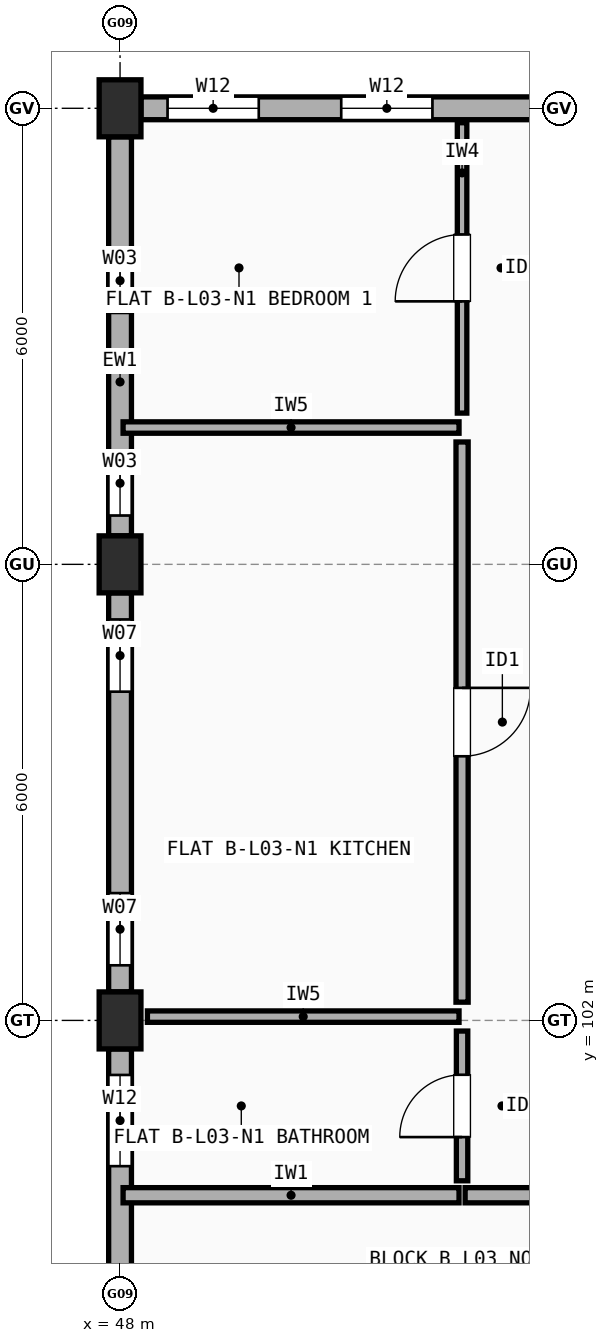
"""IFC4 building model, lengths in metres.
Left out: names, types, materials, properties, quantities, classifications, styles, units other than length and angle.
Written with IfcOpenShell. Run it as: python <this file> out.ifc"""

import sys

from ifc_helpers import new_model, si_unit, direction, frame, frame_2d, origin, origin_2d, place, context, subcontext, project, spatial, rectangle, extrude, element, fill, save


model = new_model("IFC4")
c1 = context("Model", 3, precision=1e-05, world=origin(), true_north=direction((0.0, 1.0)))
c2 = subcontext(c1, "Body", "Model", "MODEL_VIEW")
j1 = project(units=[si_unit("LENGTHUNIT", "METRE"), si_unit("PLANEANGLEUNIT", "RADIAN")], contexts=[c1])
p1 = place(None, origin())
s1 = spatial("IfcSite", under=j1, at=p1, CompositionType="ELEMENT")
p2 = place(p1, origin())
s2 = spatial("IfcBuilding", under=s1, at=p2, CompositionType="ELEMENT")
p3 = place(p2, frame((0.0, 0.0, 10.9)))
s3 = spatial("IfcBuildingStorey", under=s2, at=p3, CompositionType="ELEMENT", Elevation=10.9)
for number, where, z_axis, x_axis in (
    (1, (48.0, 102.0, 0.0), (0.0, 0.0, 1.0), (1.0, 0.0, 0.0)),
    (2, (48.0, 108.0, 0.0), (0.0, 0.0, 1.0), (1.0, 0.0, 0.0)),
    (3, (48.0, 114.0, 0.0), (0.0, 0.0, 1.0), (1.0, 0.0, 0.0)),
):
    element("IfcColumn", number, at=place(p3, frame(where, z_axis=z_axis, x_axis=x_axis)), inside=s3, PredefinedType="COLUMN", context=c2, shape_type="SweptSolid", body=[
        extrude(rectangle(XDim=0.55, YDim=0.75, at=origin_2d()), origin(), (0.0, 0.0, 1.0), 2.96),
    ])
p4 = place(p3, frame((53.675, 114.0, 0.0), z_axis=(0.0, 0.0, 1.0), x_axis=(-1.0, 0.0, 0.0)))
e4 = element("IfcWall", 4, at=p4, inside=s3, PredefinedType="STANDARD", context=c2, shape_type="SweptSolid", body=[
    extrude(rectangle(XDim=5.4, YDim=0.3, at=frame_2d((2.7, 0.0))), origin(), (0.0, 0.0, 1.0), 2.442),
])
p5 = place(p4, frame((1.565, 0.0, 0.9)))
e5 = element("IfcOpeningElement", 5, at=p5, cuts=e4, PredefinedType="OPENING", context=c2, shape_type="SweptSolid", body=[
    extrude(rectangle(XDim=1.2, YDim=1.35, at=frame_2d((0.6, 0.675))), frame((0.0, 0.16, 0.0), z_axis=(0.0, -1.0, 0.0), x_axis=(1.0, 0.0, 0.0)), (0.0, 0.0, 1.0), 0.32),
])
p6 = place(p4, frame((3.85, 0.0, 0.9)))
e6 = element("IfcOpeningElement", 6, at=p6, cuts=e4, PredefinedType="OPENING", context=c2, shape_type="SweptSolid", body=[
    extrude(rectangle(XDim=1.2, YDim=1.35, at=frame_2d((0.6, 0.675))), frame((0.0, 0.16, 0.0), z_axis=(0.0, -1.0, 0.0), x_axis=(1.0, 0.0, 0.0)), (0.0, 0.0, 1.0), 0.32),
])
p7 = place(p3, frame((48.0, 113.625, 0.0), z_axis=(0.0, 0.0, 1.0), x_axis=(0.0, -1.0, 0.0)))
e7 = element("IfcWall", 7, at=p7, inside=s3, PredefinedType="STANDARD", context=c2, shape_type="SweptSolid", body=[
    extrude(rectangle(XDim=5.25, YDim=0.3, at=frame_2d((2.625, 0.0))), origin(), (0.0, 0.0, 1.0), 2.442),
])
p8 = place(p7, frame((1.468, 0.0, 0.9)))
e8 = element("IfcOpeningElement", 8, at=p8, cuts=e7, PredefinedType="OPENING", context=c2, shape_type="SweptSolid", body=[
    extrude(rectangle(XDim=0.85, YDim=1.25, at=frame_2d((0.425, 0.625))), frame((0.0, 0.16, 0.0), z_axis=(0.0, -1.0, 0.0), x_axis=(1.0, 0.0, 0.0)), (0.0, 0.0, 1.0), 0.32),
])
p9 = place(p7, frame((4.133, 0.0, 0.9)))
e9 = element("IfcOpeningElement", 9, at=p9, cuts=e7, PredefinedType="OPENING", context=c2, shape_type="SweptSolid", body=[
    extrude(rectangle(XDim=0.85, YDim=1.25, at=frame_2d((0.425, 0.625))), frame((0.0, 0.16, 0.0), z_axis=(0.0, -1.0, 0.0), x_axis=(1.0, 0.0, 0.0)), (0.0, 0.0, 1.0), 0.32),
])
p10 = place(p3, frame((48.0, 107.625, 0.0), z_axis=(0.0, 0.0, 1.0), x_axis=(0.0, -1.0, 0.0)))
e10 = element("IfcWall", 10, at=p10, inside=s3, PredefinedType="STANDARD", context=c2, shape_type="SweptSolid", body=[
    extrude(rectangle(XDim=5.25, YDim=0.3, at=frame_2d((2.625, 0.0))), origin(), (0.0, 0.0, 1.0), 2.442),
])
p11 = place(p10, frame((0.35, 0.0, 0.9)))
e11 = element("IfcOpeningElement", 11, at=p11, cuts=e10, PredefinedType="OPENING", context=c2, shape_type="SweptSolid", body=[
    extrude(rectangle(XDim=0.95, YDim=1.35, at=frame_2d((0.475, 0.675))), frame((0.0, 0.16, 0.0), z_axis=(0.0, -1.0, 0.0), x_axis=(1.0, 0.0, 0.0)), (0.0, 0.0, 1.0), 0.32),
])
p12 = place(p10, frame((3.95, 0.0, 0.9)))
e12 = element("IfcOpeningElement", 12, at=p12, cuts=e10, PredefinedType="OPENING", context=c2, shape_type="SweptSolid", body=[
    extrude(rectangle(XDim=0.95, YDim=1.35, at=frame_2d((0.475, 0.675))), frame((0.0, 0.16, 0.0), z_axis=(0.0, -1.0, 0.0), x_axis=(1.0, 0.0, 0.0)), (0.0, 0.0, 1.0), 0.32),
])
p13 = place(p3, frame((48.0, 101.625, 0.0), z_axis=(0.0, 0.0, 1.0), x_axis=(0.0, -1.0, 0.0)))
e13 = element("IfcWall", 13, at=p13, inside=s3, PredefinedType="STANDARD", context=c2, shape_type="SweptSolid", body=[
    extrude(rectangle(XDim=5.25, YDim=0.3, at=frame_2d((2.625, 0.0))), origin(), (0.0, 0.0, 1.0), 2.442),
])
p14 = place(p13, frame((0.343, 0.0, 0.9)))
e14 = element("IfcOpeningElement", 14, at=p14, cuts=e13, PredefinedType="OPENING", context=c2, shape_type="SweptSolid", body=[
    extrude(rectangle(XDim=1.2, YDim=1.35, at=frame_2d((0.6, 0.675))), frame((0.0, 0.16, 0.0), z_axis=(0.0, -1.0, 0.0), x_axis=(1.0, 0.0, 0.0)), (0.0, 0.0, 1.0), 0.32),
])
p15 = place(p13, frame((3.208, 0.0, 0.9)))
e15 = element("IfcOpeningElement", 15, at=p15, cuts=e13, PredefinedType="OPENING", context=c2, shape_type="SweptSolid", body=[
    extrude(rectangle(XDim=0.8, YDim=1.2, at=frame_2d((0.4, 0.6))), frame((0.0, 0.16, 0.0), z_axis=(0.0, -1.0, 0.0), x_axis=(1.0, 0.0, 0.0)), (0.0, 0.0, 1.0), 0.32),
])
p16 = place(p3, frame((48.04, 99.7, 0.0), z_axis=(0.0, 0.0, 1.0), x_axis=(1.0, 0.0, 0.0)))
e16 = element("IfcWall", 16, at=p16, inside=s3, PredefinedType="SOLIDWALL", context=c2, shape_type="SweptSolid", body=[
    extrude(rectangle(XDim=4.42, YDim=0.2, at=frame_2d((2.21, 0.0))), origin(), (0.0, 0.0, 1.0), 2.442),
])
p17 = place(p3, frame((52.54, 99.7, 0.0), z_axis=(0.0, 0.0, 1.0), x_axis=(1.0, 0.0, 0.0)))
e17 = element("IfcWall", 17, at=p17, inside=s3, PredefinedType="SOLIDWALL", context=c2, shape_type="SweptSolid", body=[
    extrude(rectangle(XDim=10.42, YDim=0.2, at=frame_2d((5.21, 0.0))), origin(), (0.0, 0.0, 1.0), 2.508),
])
p18 = place(p17, frame((4.71, 0.0, 0.0)))
e18 = element("IfcOpeningElement", 18, at=p18, cuts=e17, PredefinedType="OPENING", context=c2, shape_type="SweptSolid", body=[
    extrude(rectangle(XDim=1.0, YDim=2.15, at=frame_2d((0.5, 1.075))), frame((0.0, 0.11, 0.0), z_axis=(0.0, -1.0, 0.0), x_axis=(1.0, 0.0, 0.0)), (0.0, 0.0, 1.0), 0.22),
])
p19 = place(p3, frame((52.5, 109.99, 0.0), z_axis=(0.0, 0.0, 1.0), x_axis=(0.0, 1.0, 0.0)))
e19 = element("IfcWall", 19, at=p19, inside=s3, PredefinedType="PARTITIONING", context=c2, shape_type="SweptSolid", body=[
    extrude(rectangle(XDim=3.82, YDim=0.125, at=frame_2d((1.91, 0.0))), origin(), (0.0, 0.0, 1.0), 2.96),
])
p20 = place(p19, frame((1.47, 0.0, 0.0)))
e20 = element("IfcOpeningElement", 20, at=p20, cuts=e19, PredefinedType="OPENING", context=c2, shape_type="SweptSolid", body=[
    extrude(rectangle(XDim=0.88, YDim=2.1, at=frame_2d((0.44, 1.05))), frame((0.0, 0.073, 0.0), z_axis=(0.0, -1.0, 0.0), x_axis=(1.0, 0.0, 0.0)), (0.0, 0.0, 1.0), 0.145),
])
p21 = place(p3, frame((52.5, 102.24, 0.0), z_axis=(0.0, 0.0, 1.0), x_axis=(0.0, 1.0, 0.0)))
e21 = element("IfcWall", 21, at=p21, inside=s3, PredefinedType="PLUMBINGWALL", context=c2, shape_type="SweptSolid", body=[
    extrude(rectangle(XDim=7.37, YDim=0.16, at=frame_2d((3.685, 0.0))), origin(), (0.0, 0.0, 1.0), 2.442),
])
p22 = place(p21, frame((3.235, 0.0, 0.0)))
e22 = element("IfcOpeningElement", 22, at=p22, cuts=e21, PredefinedType="OPENING", context=c2, shape_type="SweptSolid", body=[
    extrude(rectangle(XDim=0.9, YDim=2.1, at=frame_2d((0.45, 1.05))), frame((0.0, 0.09, 0.0), z_axis=(0.0, -1.0, 0.0), x_axis=(1.0, 0.0, 0.0)), (0.0, 0.0, 1.0), 0.18),
])
p23 = place(p3, frame((52.5, 99.89, 0.0), z_axis=(0.0, 0.0, 1.0), x_axis=(0.0, 1.0, 0.0)))
e23 = element("IfcWall", 23, at=p23, inside=s3, PredefinedType="PARTITIONING", context=c2, shape_type="SweptSolid", body=[
    extrude(rectangle(XDim=1.97, YDim=0.15, at=frame_2d((0.985, 0.0))), origin(), (0.0, 0.0, 1.0), 2.96),
])
p24 = place(p23, frame((0.575, 0.0, 0.0)))
e24 = element("IfcOpeningElement", 24, at=p24, cuts=e23, PredefinedType="OPENING", context=c2, shape_type="SweptSolid", body=[
    extrude(rectangle(XDim=0.82, YDim=2.08, at=frame_2d((0.41, 1.04))), frame((0.0, 0.085, 0.0), z_axis=(0.0, -1.0, 0.0), x_axis=(1.0, 0.0, 0.0)), (0.0, 0.0, 1.0), 0.17),
])
p25 = place(p3, frame((48.04, 109.8, 0.0), z_axis=(0.0, 0.0, 1.0), x_axis=(1.0, 0.0, 0.0)))
e25 = element("IfcWall", 25, at=p25, inside=s3, PredefinedType="PARTITIONING", context=c2, shape_type="SweptSolid", body=[
    extrude(rectangle(XDim=4.42, YDim=0.15, at=frame_2d((2.21, 0.0))), origin(), (0.0, 0.0, 1.0), 2.442),
])
p26 = place(p3, frame((48.36, 102.05, 0.0), z_axis=(0.0, 0.0, 1.0), x_axis=(1.0, 0.0, 0.0)))
e26 = element("IfcWall", 26, at=p26, inside=s3, PredefinedType="PARTITIONING", context=c2, shape_type="SweptSolid", body=[
    extrude(rectangle(XDim=4.1, YDim=0.15, at=frame_2d((2.05, 0.0))), origin(), (0.0, 0.0, 1.0), 2.442),
])
p27 = place(p5, origin())
e27 = element("IfcWindow", 27, at=p27, inside=s3, PartitioningType="SINGLE_PANEL", PredefinedType="WINDOW", context=c2, shape_type="SweptSolid", body=[
    extrude(rectangle(XDim=1.2, YDim=1.35, at=frame_2d((0.6, 0.675))), frame((0.0, 0.03, 0.0), z_axis=(0.0, -1.0, 0.0), x_axis=(1.0, 0.0, 0.0)), (0.0, 0.0, 1.0), 0.06),
])
fill(e5, e27)
p28 = place(p6, origin())
e28 = element("IfcWindow", 28, at=p28, inside=s3, PartitioningType="SINGLE_PANEL", PredefinedType="WINDOW", context=c2, shape_type="SweptSolid", body=[
    extrude(rectangle(XDim=1.2, YDim=1.35, at=frame_2d((0.6, 0.675))), frame((0.0, 0.03, 0.0), z_axis=(0.0, -1.0, 0.0), x_axis=(1.0, 0.0, 0.0)), (0.0, 0.0, 1.0), 0.06),
])
fill(e6, e28)
p29 = place(p8, origin())
e29 = element("IfcWindow", 29, at=p29, inside=s3, PartitioningType="SINGLE_PANEL", PredefinedType="WINDOW", context=c2, shape_type="SweptSolid", body=[
    extrude(rectangle(XDim=0.85, YDim=1.25, at=frame_2d((0.425, 0.625))), frame((0.0, 0.03, 0.0), z_axis=(0.0, -1.0, 0.0), x_axis=(1.0, 0.0, 0.0)), (0.0, 0.0, 1.0), 0.06),
])
fill(e8, e29)
p30 = place(p9, origin())
e30 = element("IfcWindow", 30, at=p30, inside=s3, PartitioningType="SINGLE_PANEL", PredefinedType="WINDOW", context=c2, shape_type="SweptSolid", body=[
    extrude(rectangle(XDim=0.85, YDim=1.25, at=frame_2d((0.425, 0.625))), frame((0.0, 0.03, 0.0), z_axis=(0.0, -1.0, 0.0), x_axis=(1.0, 0.0, 0.0)), (0.0, 0.0, 1.0), 0.06),
])
fill(e9, e30)
p31 = place(p11, origin())
e31 = element("IfcWindow", 31, at=p31, inside=s3, PartitioningType="SINGLE_PANEL", PredefinedType="WINDOW", context=c2, shape_type="SweptSolid", body=[
    extrude(rectangle(XDim=0.95, YDim=1.35, at=frame_2d((0.475, 0.675))), frame((0.0, 0.03, 0.0), z_axis=(0.0, -1.0, 0.0), x_axis=(1.0, 0.0, 0.0)), (0.0, 0.0, 1.0), 0.06),
])
fill(e11, e31)
p32 = place(p12, origin())
e32 = element("IfcWindow", 32, at=p32, inside=s3, PartitioningType="SINGLE_PANEL", PredefinedType="WINDOW", context=c2, shape_type="SweptSolid", body=[
    extrude(rectangle(XDim=0.95, YDim=1.35, at=frame_2d((0.475, 0.675))), frame((0.0, 0.03, 0.0), z_axis=(0.0, -1.0, 0.0), x_axis=(1.0, 0.0, 0.0)), (0.0, 0.0, 1.0), 0.06),
])
fill(e12, e32)
p33 = place(p14, origin())
e33 = element("IfcWindow", 33, at=p33, inside=s3, PartitioningType="SINGLE_PANEL", PredefinedType="WINDOW", context=c2, shape_type="SweptSolid", body=[
    extrude(rectangle(XDim=1.2, YDim=1.35, at=frame_2d((0.6, 0.675))), frame((0.0, 0.03, 0.0), z_axis=(0.0, -1.0, 0.0), x_axis=(1.0, 0.0, 0.0)), (0.0, 0.0, 1.0), 0.06),
])
fill(e14, e33)
p34 = place(p20, origin())
e34 = element("IfcDoor", 34, at=p34, inside=s3, OperationType="SINGLE_SWING_LEFT", PredefinedType="DOOR", context=c2, shape_type="SweptSolid", body=[
    extrude(rectangle(XDim=0.88, YDim=2.1, at=frame_2d((0.44, 1.05))), frame((0.0, 0.025, 0.0), z_axis=(0.0, -1.0, 0.0), x_axis=(1.0, 0.0, 0.0)), (0.0, 0.0, 1.0), 0.05),
])
fill(e20, e34)
p35 = place(p22, origin())
e35 = element("IfcDoor", 35, at=p35, inside=s3, OperationType="SINGLE_SWING_RIGHT", PredefinedType="DOOR", context=c2, shape_type="SweptSolid", body=[
    extrude(rectangle(XDim=0.9, YDim=2.1, at=frame_2d((0.45, 1.05))), frame((0.0, 0.025, 0.0), z_axis=(0.0, -1.0, 0.0), x_axis=(1.0, 0.0, 0.0)), (0.0, 0.0, 1.0), 0.05),
])
fill(e22, e35)
p36 = place(p24, origin())
e36 = element("IfcDoor", 36, at=p36, inside=s3, OperationType="SINGLE_SWING_LEFT", PredefinedType="DOOR", context=c2, shape_type="SweptSolid", body=[
    extrude(rectangle(XDim=0.82, YDim=2.08, at=frame_2d((0.41, 1.04))), frame((0.0, 0.025, 0.0), z_axis=(0.0, -1.0, 0.0), x_axis=(1.0, 0.0, 0.0)), (0.0, 0.0, 1.0), 0.05),
])
fill(e24, e36)
save(model, sys.argv[1])
